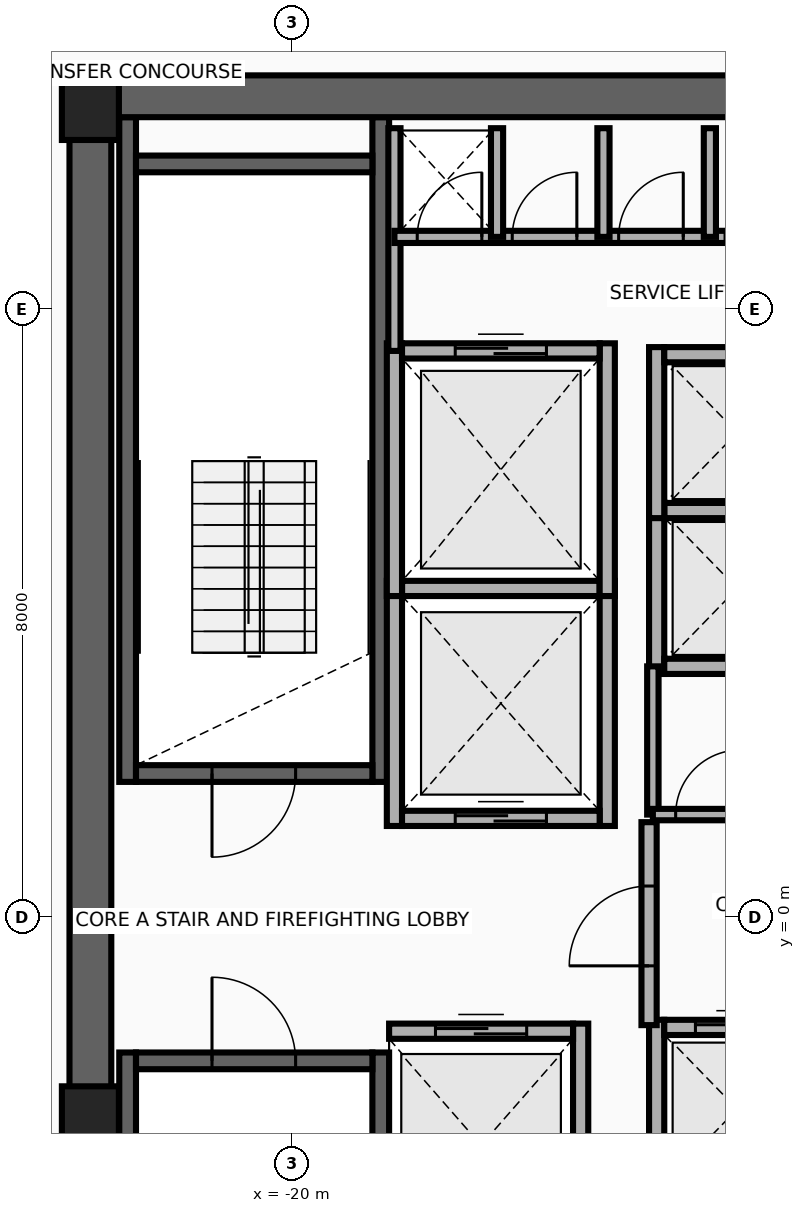
"""IFC4 building model, lengths in metres.
Left out: names, types, materials, properties, quantities, classifications, styles, units other than length and angle.
Written with IfcOpenShell. Run it as: python <this file> out.ifc"""

import sys

from ifc_helpers import new_model, si_unit, direction, frame, frame_2d, origin, origin_2d, place, context, subcontext, project, spatial, rectangle, extrude, source, transform, mapped, element, fill, save


model = new_model("IFC4")
c1 = context("Model", 3, precision=1e-05, world=origin(), true_north=direction((0.0, 1.0)))
c2 = subcontext(c1, "Body", "Model", "MODEL_VIEW")
j1 = project(units=[si_unit("LENGTHUNIT", "METRE"), si_unit("PLANEANGLEUNIT", "RADIAN")], contexts=[c1])
p1 = place(None, origin())
s1 = spatial("IfcSite", under=j1, at=p1, CompositionType="ELEMENT")
p2 = place(p1, origin())
s2 = spatial("IfcBuilding", under=s1, at=p2, CompositionType="ELEMENT")
p3 = place(p2, frame((0.0, 0.0, 287.0)))
s3 = spatial("IfcBuildingStorey", under=s2, at=p3, CompositionType="ELEMENT", Elevation=287.0)
for number, where, z_axis, x_axis in (
    (1, (-22.16, 1.78, 0.0), (0.0, 0.0, 1.0), (0.0, 1.0, 0.0)),
    (2, (-18.83, 1.78, 0.0), (0.0, 0.0, 1.0), (0.0, 1.0, 0.0)),
):
    element("IfcWall", number, at=place(p3, frame(where, z_axis=z_axis, x_axis=x_axis)), inside=s3, PredefinedType="SHEAR", context=c2, shape_type="SweptSolid", body=[
        extrude(rectangle(XDim=8.745, YDim=0.22, at=frame_2d((4.373, 0.0))), origin(), (0.0, 0.0, 1.0), 3.36),
    ])
p4 = place(p3, frame((-22.05, 1.89, 0.0), z_axis=(0.0, 0.0, 1.0), x_axis=(1.0, 0.0, 0.0)))
e3 = element("IfcWall", 3, at=p4, inside=s3, PredefinedType="SHEAR", context=c2, shape_type="SweptSolid", body=[
    extrude(rectangle(XDim=3.11, YDim=0.22, at=frame_2d((1.555, 0.0))), origin(), (0.0, 0.0, 1.0), 3.36),
])
p5 = place(p4, frame((1.0, 0.0, 0.0)))
e4 = element("IfcOpeningElement", 4, at=p5, cuts=e3, PredefinedType="OPENING", context=c2, shape_type="SweptSolid", body=[
    extrude(rectangle(XDim=1.1, YDim=2.15, at=frame_2d((0.55, 1.075))), frame((0.0, 0.125, 0.0), z_axis=(0.0, -1.0, 0.0), x_axis=(1.0, 0.0, 0.0)), (0.0, 0.0, 1.0), 0.25),
])
p6 = place(p3, frame((-22.05, 9.91, 0.0), z_axis=(0.0, 0.0, 1.0), x_axis=(1.0, 0.0, 0.0)))
e5 = element("IfcWall", 5, at=p6, inside=s3, PredefinedType="SHEAR", context=c2, shape_type="SweptSolid", body=[
    extrude(rectangle(XDim=3.11, YDim=0.22, at=frame_2d((1.555, 0.0))), origin(), (0.0, 0.0, 1.0), 3.36),
])
for number, where, z_axis, x_axis in (
    (6, (-22.16, -10.525, 0.0), (0.0, 0.0, 1.0), (0.0, 1.0, 0.0)),
    (7, (-18.83, -10.525, 0.0), (0.0, 0.0, 1.0), (0.0, 1.0, 0.0)),
):
    element("IfcWall", number, at=place(p3, frame(where, z_axis=z_axis, x_axis=x_axis)), inside=s3, PredefinedType="SHEAR", context=c2, shape_type="SweptSolid", body=[
        extrude(rectangle(XDim=8.745, YDim=0.22, at=frame_2d((4.373, 0.0))), origin(), (0.0, 0.0, 1.0), 3.36),
    ])
p7 = place(p3, frame((-22.05, -1.89, 0.0), z_axis=(0.0, 0.0, 1.0), x_axis=(1.0, 0.0, 0.0)))
e8 = element("IfcWall", 8, at=p7, inside=s3, PredefinedType="SHEAR", context=c2, shape_type="SweptSolid", body=[
    extrude(rectangle(XDim=3.11, YDim=0.22, at=frame_2d((1.555, 0.0))), origin(), (0.0, 0.0, 1.0), 3.36),
])
p8 = place(p7, frame((1.0, 0.0, 0.0)))
e9 = element("IfcOpeningElement", 9, at=p8, cuts=e8, PredefinedType="OPENING", context=c2, shape_type="SweptSolid", body=[
    extrude(rectangle(XDim=1.1, YDim=2.15, at=frame_2d((0.55, 1.075))), frame((0.0, 0.125, 0.0), z_axis=(0.0, -1.0, 0.0), x_axis=(1.0, 0.0, 0.0)), (0.0, 0.0, 1.0), 0.25),
])
p9 = place(p3, frame((-22.65, -11.075, 0.0), z_axis=(0.0, 0.0, 1.0), x_axis=(0.0, 1.0, 0.0)))
e10 = element("IfcWall", 10, at=p9, inside=s3, PredefinedType="SHEAR", context=c2, shape_type="SweptSolid", body=[
    extrude(rectangle(XDim=22.15, YDim=0.55, at=frame_2d((11.075, 0.0))), origin(), (0.0, 0.0, 1.0), 3.36),
])
p10 = place(p3, frame((-22.65, 10.8, 0.0), z_axis=(0.0, 0.0, 1.0), x_axis=(1.0, 0.0, 0.0)))
e11 = element("IfcWall", 11, at=p10, inside=s3, PredefinedType="SHEAR", context=c2, shape_type="SweptSolid", body=[
    extrude(rectangle(XDim=10.25, YDim=0.55, at=frame_2d((5.125, 0.0))), origin(), (0.0, 0.0, 1.0), 3.36),
])
m1 = source(origin(), c2, "Body", "SweptSolid", [
    extrude(rectangle(XDim=0.75, YDim=0.75, at=origin_2d()), origin(), (0.0, 0.0, 1.0), 3.6),
])
for number, where, z_axis, x_axis in (
    (12, (-22.65, -2.6, 0.0), (0.0, 0.0, 1.0), (1.0, 0.0, 0.0)),
    (13, (-22.65, 10.6, 0.0), (0.0, 0.0, 1.0), (1.0, 0.0, 0.0)),
):
    element("IfcColumn", number, at=place(p3, frame(where, z_axis=z_axis, x_axis=x_axis)), inside=s3, PredefinedType="COLUMN", context=c2, shape_type="MappedRepresentation", body=[
        mapped(m1, transform((0.0, 0.0, 0.0), x_axis=(1.0, 0.0, 0.0), y_axis=(0.0, 1.0, 0.0), z_axis=(0.0, 0.0, 1.0), scale=1.0)),
    ])
for number, where, z_axis, x_axis in (
    (14, (-18.65, 1.2, 0.0), (0.0, 0.0, 1.0), (0.0, 1.0, 0.0)),
    (15, (-15.85, 1.2, 0.0), (0.0, 0.0, 1.0), (0.0, 1.0, 0.0)),
):
    element("IfcWall", number, at=place(p3, frame(where, z_axis=z_axis, x_axis=x_axis)), inside=s3, PredefinedType="MOVABLE", context=c2, shape_type="SweptSolid", body=[
        extrude(rectangle(XDim=3.225, YDim=0.2, at=frame_2d((1.613, 0.0))), origin(), (0.0, 0.0, 1.0), 3.36),
    ])
p11 = place(p3, frame((-18.55, 1.3, 0.0), z_axis=(0.0, 0.0, 1.0), x_axis=(1.0, 0.0, 0.0)))
e16 = element("IfcWall", 16, at=p11, inside=s3, PredefinedType="MOVABLE", context=c2, shape_type="SweptSolid", body=[
    extrude(rectangle(XDim=2.6, YDim=0.2, at=frame_2d((1.3, 0.0))), origin(), (0.0, 0.0, 1.0), 3.36),
])
p12 = place(p11, frame((0.7, 0.0, 0.0)))
e17 = element("IfcOpeningElement", 17, at=p12, cuts=e16, PredefinedType="OPENING", context=c2, shape_type="SweptSolid", body=[
    extrude(rectangle(XDim=1.2, YDim=2.1, at=frame_2d((0.6, 1.05))), frame((0.0, 0.115, 0.0), z_axis=(0.0, -1.0, 0.0), x_axis=(1.0, 0.0, 0.0)), (0.0, 0.0, 1.0), 0.23),
])
p13 = place(p3, frame((-18.55, 4.325, 0.0), z_axis=(0.0, 0.0, 1.0), x_axis=(1.0, 0.0, 0.0)))
e18 = element("IfcWall", 18, at=p13, inside=s3, PredefinedType="MOVABLE", context=c2, shape_type="SweptSolid", body=[
    extrude(rectangle(XDim=2.6, YDim=0.2, at=frame_2d((1.3, 0.0))), origin(), (0.0, 0.0, 1.0), 3.36),
])
p14 = place(p3, frame((-16.2, -4.6, 0.0), z_axis=(0.0, 0.0, 1.0), x_axis=(0.0, 1.0, 0.0)))
e19 = element("IfcWall", 19, at=p14, inside=s3, PredefinedType="MOVABLE", context=c2, shape_type="SweptSolid", body=[
    extrude(rectangle(XDim=3.2, YDim=0.2, at=frame_2d((1.6, 0.0))), origin(), (0.0, 0.0, 1.0), 3.36),
])
p15 = place(p3, frame((-18.72, -1.5, 0.0), z_axis=(0.0, 0.0, 1.0), x_axis=(1.0, 0.0, 0.0)))
e20 = element("IfcWall", 20, at=p15, inside=s3, PredefinedType="MOVABLE", context=c2, shape_type="SweptSolid", body=[
    extrude(rectangle(XDim=2.42, YDim=0.2, at=frame_2d((1.21, 0.0))), origin(), (0.0, 0.0, 1.0), 3.36),
])
p16 = place(p15, frame((0.61, 0.0, 0.0)))
e21 = element("IfcOpeningElement", 21, at=p16, cuts=e20, PredefinedType="OPENING", context=c2, shape_type="SweptSolid", body=[
    extrude(rectangle(XDim=1.2, YDim=2.1, at=frame_2d((0.6, 1.05))), frame((0.0, 0.115, 0.0), z_axis=(0.0, -1.0, 0.0), x_axis=(1.0, 0.0, 0.0)), (0.0, 0.0, 1.0), 0.23),
])
for number, where, z_axis, x_axis in (
    (22, (-18.65, 4.225, 0.0), (0.0, 0.0, 1.0), (0.0, 1.0, 0.0)),
    (23, (-15.85, 4.225, 0.0), (0.0, 0.0, 1.0), (0.0, 1.0, 0.0)),
):
    element("IfcWall", number, at=place(p3, frame(where, z_axis=z_axis, x_axis=x_axis)), inside=s3, PredefinedType="MOVABLE", context=c2, shape_type="SweptSolid", body=[
        extrude(rectangle(XDim=3.325, YDim=0.2, at=frame_2d((1.663, 0.0))), origin(), (0.0, 0.0, 1.0), 3.36),
    ])
p17 = place(p3, frame((-18.55, 7.45, 0.0), z_axis=(0.0, 0.0, 1.0), x_axis=(1.0, 0.0, 0.0)))
e24 = element("IfcWall", 24, at=p17, inside=s3, PredefinedType="MOVABLE", context=c2, shape_type="SweptSolid", body=[
    extrude(rectangle(XDim=2.6, YDim=0.2, at=frame_2d((1.3, 0.0))), origin(), (0.0, 0.0, 1.0), 3.36),
])
p18 = place(p17, frame((0.7, 0.0, 0.0)))
e25 = element("IfcOpeningElement", 25, at=p18, cuts=e24, PredefinedType="OPENING", context=c2, shape_type="SweptSolid", body=[
    extrude(rectangle(XDim=1.2, YDim=2.1, at=frame_2d((0.6, 1.05))), frame((0.0, 0.115, 0.0), z_axis=(0.0, -1.0, 0.0), x_axis=(1.0, 0.0, 0.0)), (0.0, 0.0, 1.0), 0.23),
])
p19 = place(p3, frame((-15.2, 3.2, 0.0), z_axis=(0.0, 0.0, 1.0), x_axis=(0.0, 1.0, 0.0)))
e26 = element("IfcWall", 26, at=p19, inside=s3, PredefinedType="MOVABLE", context=c2, shape_type="SweptSolid", body=[
    extrude(rectangle(XDim=2.25, YDim=0.2, at=frame_2d((1.125, 0.0))), origin(), (0.0, 0.0, 1.0), 3.36),
])
for number, where, z_axis, x_axis in (
    (27, (-15.1, 3.3, 0.0), (0.0, 0.0, 1.0), (1.0, 0.0, 0.0)),
    (28, (-15.1, 5.35, 0.0), (0.0, 0.0, 1.0), (1.0, 0.0, 0.0)),
):
    element("IfcWall", number, at=place(p3, frame(where, z_axis=z_axis, x_axis=x_axis)), inside=s3, PredefinedType="MOVABLE", context=c2, shape_type="SweptSolid", body=[
        extrude(rectangle(XDim=1.92, YDim=0.2, at=frame_2d((0.96, 0.0))), origin(), (0.0, 0.0, 1.0), 3.36),
    ])
p20 = place(p3, frame((-15.2, 5.25, 0.0), z_axis=(0.0, 0.0, 1.0), x_axis=(0.0, 1.0, 0.0)))
e29 = element("IfcWall", 29, at=p20, inside=s3, PredefinedType="MOVABLE", context=c2, shape_type="SweptSolid", body=[
    extrude(rectangle(XDim=2.25, YDim=0.2, at=frame_2d((1.125, 0.0))), origin(), (0.0, 0.0, 1.0), 3.36),
])
p21 = place(p3, frame((-15.1, 7.4, 0.0), z_axis=(0.0, 0.0, 1.0), x_axis=(1.0, 0.0, 0.0)))
e30 = element("IfcWall", 30, at=p21, inside=s3, PredefinedType="MOVABLE", context=c2, shape_type="SweptSolid", body=[
    extrude(rectangle(XDim=1.92, YDim=0.2, at=frame_2d((0.96, 0.0))), origin(), (0.0, 0.0, 1.0), 3.36),
])
p22 = place(p3, frame((-15.2, -3.7, 0.0), z_axis=(0.0, 0.0, 1.0), x_axis=(0.0, 1.0, 0.0)))
e31 = element("IfcWall", 31, at=p22, inside=s3, PredefinedType="MOVABLE", context=c2, shape_type="SweptSolid", body=[
    extrude(rectangle(XDim=2.35, YDim=0.2, at=frame_2d((1.175, 0.0))), origin(), (0.0, 0.0, 1.0), 3.36),
])
p23 = place(p3, frame((-15.1, -1.45, 0.0), z_axis=(0.0, 0.0, 1.0), x_axis=(1.0, 0.0, 0.0)))
e32 = element("IfcWall", 32, at=p23, inside=s3, PredefinedType="MOVABLE", context=c2, shape_type="SweptSolid", body=[
    extrude(rectangle(XDim=1.92, YDim=0.2, at=frame_2d((0.96, 0.0))), origin(), (0.0, 0.0, 1.0), 3.36),
])
p24 = place(p23, frame((0.41, 0.0, 0.0)))
e33 = element("IfcOpeningElement", 33, at=p24, cuts=e32, PredefinedType="OPENING", context=c2, shape_type="SweptSolid", body=[
    extrude(rectangle(XDim=1.1, YDim=2.1, at=frame_2d((0.55, 1.05))), frame((0.0, 0.115, 0.0), z_axis=(0.0, -1.0, 0.0), x_axis=(1.0, 0.0, 0.0)), (0.0, 0.0, 1.0), 0.23),
])
p25 = place(p3, frame((-15.3, -1.42, 0.0), z_axis=(0.0, 0.0, 1.0), x_axis=(0.0, 1.0, 0.0)))
e34 = element("IfcWall", 34, at=p25, inside=s3, PredefinedType="PARTITIONING", context=c2, shape_type="SweptSolid", body=[
    extrude(rectangle(XDim=2.67, YDim=0.2, at=frame_2d((1.335, 0.0))), origin(), (0.0, 0.0, 1.0), 3.36),
])
p26 = place(p25, frame((0.78, 0.0, 0.0)))
e35 = element("IfcOpeningElement", 35, at=p26, cuts=e34, PredefinedType="OPENING", context=c2, shape_type="SweptSolid", body=[
    extrude(rectangle(XDim=1.05, YDim=2.15, at=frame_2d((0.525, 1.075))), frame((0.0, 0.115, 0.0), z_axis=(0.0, -1.0, 0.0), x_axis=(1.0, 0.0, 0.0)), (0.0, 0.0, 1.0), 0.23),
])
p27 = place(p3, frame((-18.65, 7.45, 0.0), z_axis=(0.0, 0.0, 1.0), x_axis=(0.0, 1.0, 0.0)))
e36 = element("IfcWall", 36, at=p27, inside=s3, PredefinedType="PARTITIONING", context=c2, shape_type="SweptSolid", body=[
    extrude(rectangle(XDim=2.93, YDim=0.16, at=frame_2d((1.465, 0.0))), origin(), (0.0, 0.0, 1.0), 3.36),
])
p28 = place(p3, frame((-18.65, 8.95, 0.0), z_axis=(0.0, 0.0, 1.0), x_axis=(1.0, 0.0, 0.0)))
e37 = element("IfcWall", 37, at=p28, inside=s3, PredefinedType="PARTITIONING", context=c2, shape_type="SweptSolid", body=[
    extrude(rectangle(XDim=5.5, YDim=0.16, at=frame_2d((2.75, 0.0))), origin(), (0.0, 0.0, 1.0), 3.36),
])
p29 = place(p28, frame((0.3, 0.0, 0.0)))
e38 = element("IfcOpeningElement", 38, at=p29, cuts=e37, PredefinedType="OPENING", context=c2, shape_type="SweptSolid", body=[
    extrude(rectangle(XDim=0.85, YDim=2.05, at=frame_2d((0.425, 1.025))), frame((0.0, 0.095, 0.0), z_axis=(0.0, -1.0, 0.0), x_axis=(1.0, 0.0, 0.0)), (0.0, 0.0, 1.0), 0.19),
])
p30 = place(p28, frame((1.55, 0.0, 0.0)))
e39 = element("IfcOpeningElement", 39, at=p30, cuts=e37, PredefinedType="OPENING", context=c2, shape_type="SweptSolid", body=[
    extrude(rectangle(XDim=0.85, YDim=2.05, at=frame_2d((0.425, 1.025))), frame((0.0, 0.095, 0.0), z_axis=(0.0, -1.0, 0.0), x_axis=(1.0, 0.0, 0.0)), (0.0, 0.0, 1.0), 0.19),
])
p31 = place(p28, frame((2.95, 0.0, 0.0)))
e40 = element("IfcOpeningElement", 40, at=p31, cuts=e37, PredefinedType="OPENING", context=c2, shape_type="SweptSolid", body=[
    extrude(rectangle(XDim=0.85, YDim=2.05, at=frame_2d((0.425, 1.025))), frame((0.0, 0.095, 0.0), z_axis=(0.0, -1.0, 0.0), x_axis=(1.0, 0.0, 0.0)), (0.0, 0.0, 1.0), 0.19),
])
p32 = place(p28, frame((4.35, 0.0, 0.0)))
e41 = element("IfcOpeningElement", 41, at=p32, cuts=e37, PredefinedType="OPENING", context=c2, shape_type="SweptSolid", body=[
    extrude(rectangle(XDim=0.85, YDim=2.05, at=frame_2d((0.425, 1.025))), frame((0.0, 0.095, 0.0), z_axis=(0.0, -1.0, 0.0), x_axis=(1.0, 0.0, 0.0)), (0.0, 0.0, 1.0), 0.19),
])
for number, where, z_axis, x_axis in (
    (42, (-17.3, 8.95, 0.0), (0.0, 0.0, 1.0), (0.0, 1.0, 0.0)),
    (43, (-15.9, 8.95, 0.0), (0.0, 0.0, 1.0), (0.0, 1.0, 0.0)),
    (44, (-14.5, 8.95, 0.0), (0.0, 0.0, 1.0), (0.0, 1.0, 0.0)),
):
    element("IfcWall", number, at=place(p3, frame(where, z_axis=z_axis, x_axis=x_axis)), inside=s3, PredefinedType="PARTITIONING", context=c2, shape_type="SweptSolid", body=[
        extrude(rectangle(XDim=1.43, YDim=0.16, at=frame_2d((0.715, 0.0))), origin(), (0.0, 0.0, 1.0), 3.36),
    ])
p33 = place(p3, frame((-15.25, 1.35, 0.0), z_axis=(0.0, 0.0, 1.0), x_axis=(0.0, 1.0, 0.0)))
e45 = element("IfcWall", 45, at=p33, inside=s3, PredefinedType="PARTITIONING", context=c2, shape_type="SweptSolid", body=[
    extrude(rectangle(XDim=1.95, YDim=0.15, at=frame_2d((0.975, 0.0))), origin(), (0.0, 0.0, 1.0), 3.36),
])
p34 = place(p3, frame((-15.25, 1.35, 0.0), z_axis=(0.0, 0.0, 1.0), x_axis=(1.0, 0.0, 0.0)))
e46 = element("IfcWall", 46, at=p34, inside=s3, PredefinedType="PARTITIONING", context=c2, shape_type="SweptSolid", body=[
    extrude(rectangle(XDim=2.1, YDim=0.15, at=frame_2d((1.05, 0.0))), origin(), (0.0, 0.0, 1.0), 3.36),
])
p35 = place(p34, frame((0.3, 0.0, 0.0)))
e47 = element("IfcOpeningElement", 47, at=p35, cuts=e46, PredefinedType="OPENING", context=c2, shape_type="SweptSolid", body=[
    extrude(rectangle(XDim=0.85, YDim=2.05, at=frame_2d((0.425, 1.025))), frame((0.0, 0.09, 0.0), z_axis=(0.0, -1.0, 0.0), x_axis=(1.0, 0.0, 0.0)), (0.0, 0.0, 1.0), 0.18),
])
p36 = place(p12, origin())
e48 = element("IfcDoor", 48, at=p36, inside=s3, OperationType="DOUBLE_DOOR_SLIDING", PredefinedType="DOOR", context=c2, shape_type="SweptSolid", body=[
    extrude(rectangle(XDim=1.2, YDim=2.1, at=frame_2d((0.6, 1.05))), frame((0.0, 0.025, 0.0), z_axis=(0.0, -1.0, 0.0), x_axis=(1.0, 0.0, 0.0)), (0.0, 0.0, 1.0), 0.05),
])
fill(e17, e48)
p37 = place(p16, origin())
e49 = element("IfcDoor", 49, at=p37, inside=s3, OperationType="DOUBLE_DOOR_SLIDING", PredefinedType="DOOR", context=c2, shape_type="SweptSolid", body=[
    extrude(rectangle(XDim=1.2, YDim=2.1, at=frame_2d((0.6, 1.05))), frame((0.0, 0.025, 0.0), z_axis=(0.0, -1.0, 0.0), x_axis=(1.0, 0.0, 0.0)), (0.0, 0.0, 1.0), 0.05),
])
fill(e21, e49)
p38 = place(p18, origin())
e50 = element("IfcDoor", 50, at=p38, inside=s3, OperationType="DOUBLE_DOOR_SLIDING", PredefinedType="DOOR", context=c2, shape_type="SweptSolid", body=[
    extrude(rectangle(XDim=1.2, YDim=2.1, at=frame_2d((0.6, 1.05))), frame((0.0, 0.025, 0.0), z_axis=(0.0, -1.0, 0.0), x_axis=(1.0, 0.0, 0.0)), (0.0, 0.0, 1.0), 0.05),
])
fill(e25, e50)
p39 = place(p24, origin())
e51 = element("IfcDoor", 51, at=p39, inside=s3, OperationType="DOUBLE_DOOR_SLIDING", PredefinedType="DOOR", context=c2, shape_type="SweptSolid", body=[
    extrude(rectangle(XDim=1.1, YDim=2.1, at=frame_2d((0.55, 1.05))), frame((0.0, 0.025, 0.0), z_axis=(0.0, -1.0, 0.0), x_axis=(1.0, 0.0, 0.0)), (0.0, 0.0, 1.0), 0.05),
])
fill(e33, e51)
p40 = place(p26, origin())
e52 = element("IfcDoor", 52, at=p40, inside=s3, OperationType="SINGLE_SWING_RIGHT", PredefinedType="DOOR", context=c2, shape_type="SweptSolid", body=[
    extrude(rectangle(XDim=1.05, YDim=2.15, at=frame_2d((0.525, 1.075))), frame((0.0, 0.025, 0.0), z_axis=(0.0, -1.0, 0.0), x_axis=(1.0, 0.0, 0.0)), (0.0, 0.0, 1.0), 0.05),
])
fill(e35, e52)
p41 = place(p5, frame((1.1, 0.0, 0.0), z_axis=(0.0, 0.0, 1.0), x_axis=(-1.0, 0.0, 0.0)))
e53 = element("IfcDoor", 53, at=p41, inside=s3, OperationType="SINGLE_SWING_LEFT", PredefinedType="DOOR", context=c2, shape_type="SweptSolid", body=[
    extrude(rectangle(XDim=1.1, YDim=2.15, at=frame_2d((0.55, 1.075))), frame((0.0, 0.025, 0.0), z_axis=(0.0, -1.0, 0.0), x_axis=(1.0, 0.0, 0.0)), (0.0, 0.0, 1.0), 0.05),
])
fill(e4, e53)
p42 = place(p8, origin())
e54 = element("IfcDoor", 54, at=p42, inside=s3, OperationType="SINGLE_SWING_RIGHT", PredefinedType="DOOR", context=c2, shape_type="SweptSolid", body=[
    extrude(rectangle(XDim=1.1, YDim=2.15, at=frame_2d((0.55, 1.075))), frame((0.0, 0.025, 0.0), z_axis=(0.0, -1.0, 0.0), x_axis=(1.0, 0.0, 0.0)), (0.0, 0.0, 1.0), 0.05),
])
fill(e9, e54)
p43 = place(p29, origin())
e55 = element("IfcDoor", 55, at=p43, inside=s3, OperationType="SINGLE_SWING_LEFT", PredefinedType="DOOR", context=c2, shape_type="SweptSolid", body=[
    extrude(rectangle(XDim=0.85, YDim=2.05, at=frame_2d((0.425, 1.025))), frame((0.0, 0.025, 0.0), z_axis=(0.0, -1.0, 0.0), x_axis=(1.0, 0.0, 0.0)), (0.0, 0.0, 1.0), 0.05),
])
fill(e38, e55)
p44 = place(p30, origin())
e56 = element("IfcDoor", 56, at=p44, inside=s3, OperationType="SINGLE_SWING_RIGHT", PredefinedType="DOOR", context=c2, shape_type="SweptSolid", body=[
    extrude(rectangle(XDim=0.85, YDim=2.05, at=frame_2d((0.425, 1.025))), frame((0.0, 0.025, 0.0), z_axis=(0.0, -1.0, 0.0), x_axis=(1.0, 0.0, 0.0)), (0.0, 0.0, 1.0), 0.05),
])
fill(e39, e56)
p45 = place(p31, origin())
e57 = element("IfcDoor", 57, at=p45, inside=s3, OperationType="SINGLE_SWING_LEFT", PredefinedType="DOOR", context=c2, shape_type="SweptSolid", body=[
    extrude(rectangle(XDim=0.85, YDim=2.05, at=frame_2d((0.425, 1.025))), frame((0.0, 0.025, 0.0), z_axis=(0.0, -1.0, 0.0), x_axis=(1.0, 0.0, 0.0)), (0.0, 0.0, 1.0), 0.05),
])
fill(e40, e57)
p46 = place(p35, origin())
e58 = element("IfcDoor", 58, at=p46, inside=s3, OperationType="SINGLE_SWING_RIGHT", PredefinedType="DOOR", context=c2, shape_type="SweptSolid", body=[
    extrude(rectangle(XDim=0.85, YDim=2.05, at=frame_2d((0.425, 1.025))), frame((0.0, 0.025, 0.0), z_axis=(0.0, -1.0, 0.0), x_axis=(1.0, 0.0, 0.0)), (0.0, 0.0, 1.0), 0.05),
])
fill(e47, e58)
save(model, sys.argv[1])
